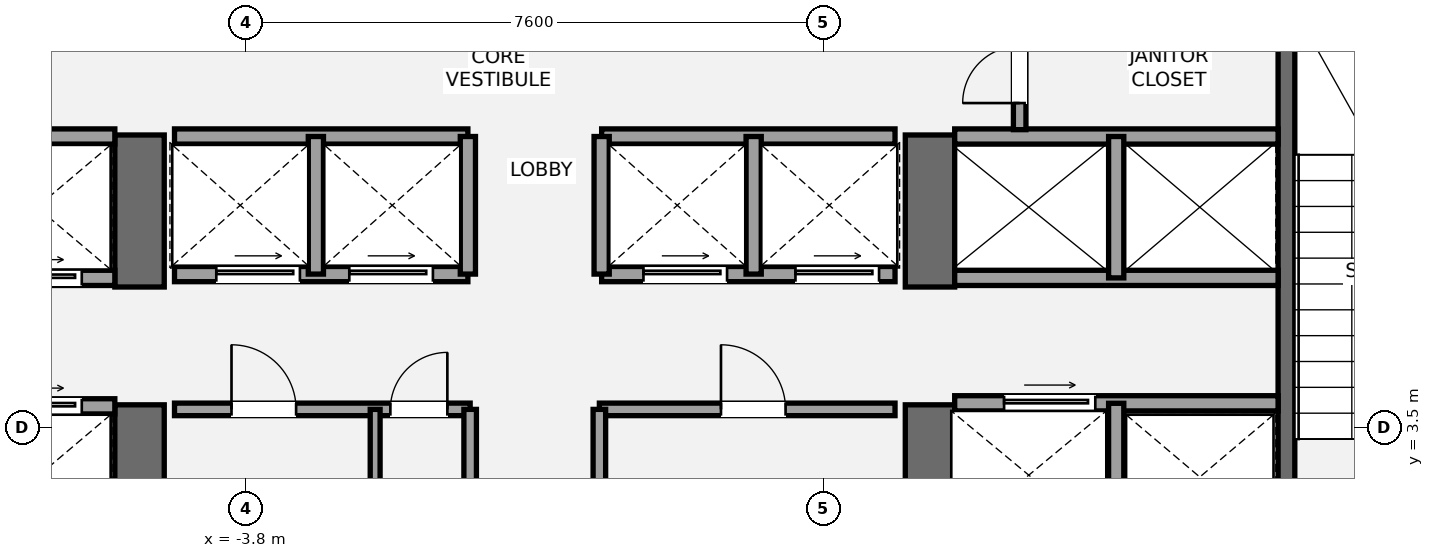
"""IFC4 building model, lengths in metres.
Left out: names, types, materials, properties, quantities, classifications, styles, units other than length and angle.
Written with IfcOpenShell. Run it as: python <this file> out.ifc"""

import sys

from ifc_helpers import new_model, si_unit, direction, frame, frame_2d, origin, place, context, subcontext, project, spatial, rectangle, extrude, element, fill, save


model = new_model("IFC4")
c1 = context("Model", 3, precision=1e-05, world=origin(), true_north=direction((0.0, 1.0)))
c2 = subcontext(c1, "Body", "Model", "MODEL_VIEW")
j1 = project(units=[si_unit("LENGTHUNIT", "METRE"), si_unit("PLANEANGLEUNIT", "RADIAN")], contexts=[c1])
p1 = place(None, origin())
s1 = spatial("IfcSite", under=j1, at=p1, CompositionType="ELEMENT")
p2 = place(p1, origin())
s2 = spatial("IfcBuilding", under=s1, at=p2, CompositionType="ELEMENT")
p3 = place(p2, frame((0.0, 0.0, 139.6)))
s3 = spatial("IfcBuildingStorey", under=s2, at=p3, CompositionType="ELEMENT", Elevation=139.6)
p4 = place(p3, frame((-5.2, 1.2, 0.0), z_axis=(0.0, 0.0, 1.0), x_axis=(0.0, 1.0, 0.0)))
e1 = element("IfcWall", 1, at=p4, inside=s3, PredefinedType="SHEAR", context=c2, shape_type="SweptSolid", body=[
    extrude(rectangle(XDim=2.6, YDim=0.65, at=frame_2d((1.3, 0.0))), origin(), (0.0, 0.0, 1.0), 4.2),
])
p5 = place(p3, frame((-5.2, 5.35, 0.0), z_axis=(0.0, 0.0, 1.0), x_axis=(0.0, 1.0, 0.0)))
e2 = element("IfcWall", 2, at=p5, inside=s3, PredefinedType="SHEAR", context=c2, shape_type="SweptSolid", body=[
    extrude(rectangle(XDim=2.0, YDim=0.65, at=frame_2d((1.0, 0.0))), origin(), (0.0, 0.0, 1.0), 4.2),
])
p6 = place(p3, frame((5.2, 1.2, 0.0), z_axis=(0.0, 0.0, 1.0), x_axis=(0.0, 1.0, 0.0)))
e3 = element("IfcWall", 3, at=p6, inside=s3, PredefinedType="SHEAR", context=c2, shape_type="SweptSolid", body=[
    extrude(rectangle(XDim=2.6, YDim=0.65, at=frame_2d((1.3, 0.0))), origin(), (0.0, 0.0, 1.0), 4.2),
])
p7 = place(p3, frame((5.2, 5.35, 0.0), z_axis=(0.0, 0.0, 1.0), x_axis=(0.0, 1.0, 0.0)))
e4 = element("IfcWall", 4, at=p7, inside=s3, PredefinedType="SHEAR", context=c2, shape_type="SweptSolid", body=[
    extrude(rectangle(XDim=2.0, YDim=0.65, at=frame_2d((1.0, 0.0))), origin(), (0.0, 0.0, 1.0), 4.2),
])
p8 = place(p3, frame((9.89, 1.85, 0.0), z_axis=(0.0, 0.0, 1.0), x_axis=(0.0, 1.0, 0.0)))
e5 = element("IfcWall", 5, at=p8, inside=s3, PredefinedType="SHEAR", context=c2, shape_type="SweptSolid", body=[
    extrude(rectangle(XDim=7.15, YDim=0.22, at=frame_2d((3.575, 0.0))), origin(), (0.0, 0.0, 1.0), 4.2),
])
p9 = place(p3, frame((-9.78, 3.78, 0.0), z_axis=(0.0, 0.0, 1.0), x_axis=(1.0, 0.0, 0.0)))
e6 = element("IfcWall", 6, at=p9, inside=s3, PredefinedType="SOLIDWALL", context=c2, shape_type="SweptSolid", body=[
    extrude(rectangle(XDim=4.255, YDim=0.2, at=frame_2d((2.127, 0.0))), origin(), (0.0, 0.0, 1.0), 4.02),
])
p10 = place(p9, frame((2.72, 0.0, 0.0)))
e7 = element("IfcOpeningElement", 7, at=p10, cuts=e6, PredefinedType="OPENING", context=c2, shape_type="SweptSolid", body=[
    extrude(rectangle(XDim=1.1, YDim=2.2, at=frame_2d((0.55, 1.1))), frame((0.0, 0.11, 0.0), z_axis=(0.0, -1.0, 0.0), x_axis=(1.0, 0.0, 0.0)), (0.0, 0.0, 1.0), 0.22),
])
p11 = place(p3, frame((-9.78, 5.47, 0.0), z_axis=(0.0, 0.0, 1.0), x_axis=(1.0, 0.0, 0.0)))
e8 = element("IfcWall", 8, at=p11, inside=s3, PredefinedType="SOLIDWALL", context=c2, shape_type="SweptSolid", body=[
    extrude(rectangle(XDim=4.255, YDim=0.2, at=frame_2d((2.127, 0.0))), origin(), (0.0, 0.0, 1.0), 4.02),
])
p12 = place(p11, frame((0.55, 0.0, 0.0)))
e9 = element("IfcOpeningElement", 9, at=p12, cuts=e8, PredefinedType="OPENING", context=c2, shape_type="SweptSolid", body=[
    extrude(rectangle(XDim=1.1, YDim=2.2, at=frame_2d((0.55, 1.1))), frame((0.0, 0.11, 0.0), z_axis=(0.0, -1.0, 0.0), x_axis=(1.0, 0.0, 0.0)), (0.0, 0.0, 1.0), 0.22),
])
p13 = place(p11, frame((2.72, 0.0, 0.0)))
e10 = element("IfcOpeningElement", 10, at=p13, cuts=e8, PredefinedType="OPENING", context=c2, shape_type="SweptSolid", body=[
    extrude(rectangle(XDim=1.1, YDim=2.2, at=frame_2d((0.55, 1.1))), frame((0.0, 0.11, 0.0), z_axis=(0.0, -1.0, 0.0), x_axis=(1.0, 0.0, 0.0)), (0.0, 0.0, 1.0), 0.22),
])
p14 = place(p3, frame((-9.78, 7.33, 0.0), z_axis=(0.0, 0.0, 1.0), x_axis=(1.0, 0.0, 0.0)))
e11 = element("IfcWall", 11, at=p14, inside=s3, PredefinedType="SOLIDWALL", context=c2, shape_type="SweptSolid", body=[
    extrude(rectangle(XDim=4.255, YDim=0.2, at=frame_2d((2.127, 0.0))), origin(), (0.0, 0.0, 1.0), 4.02),
])
p15 = place(p3, frame((5.525, 3.82, 0.0), z_axis=(0.0, 0.0, 1.0), x_axis=(1.0, 0.0, 0.0)))
e12 = element("IfcWall", 12, at=p15, inside=s3, PredefinedType="SOLIDWALL", context=c2, shape_type="SweptSolid", body=[
    extrude(rectangle(XDim=4.255, YDim=0.2, at=frame_2d((2.127, 0.0))), origin(), (0.0, 0.0, 1.0), 4.02),
])
p16 = place(p15, frame((0.65, 0.0, 0.0)))
e13 = element("IfcOpeningElement", 13, at=p16, cuts=e12, PredefinedType="OPENING", context=c2, shape_type="SweptSolid", body=[
    extrude(rectangle(XDim=1.2, YDim=2.2, at=frame_2d((0.6, 1.1))), frame((0.0, 0.11, 0.0), z_axis=(0.0, -1.0, 0.0), x_axis=(1.0, 0.0, 0.0)), (0.0, 0.0, 1.0), 0.22),
])
p17 = place(p3, frame((7.65, 1.85, 0.0), z_axis=(0.0, 0.0, 1.0), x_axis=(0.0, 1.0, 0.0)))
e14 = element("IfcWall", 14, at=p17, inside=s3, PredefinedType="SOLIDWALL", context=c2, shape_type="SweptSolid", body=[
    extrude(rectangle(XDim=1.97, YDim=0.2, at=frame_2d((0.985, 0.0))), origin(), (0.0, 0.0, 1.0), 4.02),
])
for number, where, z_axis, x_axis in (
    (15, (5.525, 5.47, 0.0), (0.0, 0.0, 1.0), (1.0, 0.0, 0.0)),
    (16, (5.525, 7.33, 0.0), (0.0, 0.0, 1.0), (1.0, 0.0, 0.0)),
):
    element("IfcWall", number, at=place(p3, frame(where, z_axis=z_axis, x_axis=x_axis)), inside=s3, PredefinedType="SOLIDWALL", context=c2, shape_type="SweptSolid", body=[
        extrude(rectangle(XDim=4.255, YDim=0.2, at=frame_2d((2.127, 0.0))), origin(), (0.0, 0.0, 1.0), 4.02),
    ])
p18 = place(p3, frame((7.65, 5.47, 0.0), z_axis=(0.0, 0.0, 1.0), x_axis=(0.0, 1.0, 0.0)))
e17 = element("IfcWall", 17, at=p18, inside=s3, PredefinedType="SOLIDWALL", context=c2, shape_type="SweptSolid", body=[
    extrude(rectangle(XDim=1.86, YDim=0.2, at=frame_2d((0.93, 0.0))), origin(), (0.0, 0.0, 1.0), 4.02),
])
p19 = place(p3, frame((-4.74, 3.74, 0.0), z_axis=(0.0, 0.0, 1.0), x_axis=(1.0, 0.0, 0.0)))
e18 = element("IfcWall", 18, at=p19, inside=s3, PredefinedType="PARTITIONING", context=c2, shape_type="SweptSolid", body=[
    extrude(rectangle(XDim=3.89, YDim=0.165, at=frame_2d((1.945, 0.0))), origin(), (0.0, 0.0, 1.0), 4.02),
])
p20 = place(p19, frame((0.75, 0.0, 0.0)))
e19 = element("IfcOpeningElement", 19, at=p20, cuts=e18, PredefinedType="OPENING", context=c2, shape_type="SweptSolid", body=[
    extrude(rectangle(XDim=0.85, YDim=2.1, at=frame_2d((0.425, 1.05))), frame((0.0, 0.093, 0.0), z_axis=(0.0, -1.0, 0.0), x_axis=(1.0, 0.0, 0.0)), (0.0, 0.0, 1.0), 0.185),
])
p21 = place(p19, frame((2.84, 0.0, 0.0)))
e20 = element("IfcOpeningElement", 20, at=p21, cuts=e18, PredefinedType="OPENING", context=c2, shape_type="SweptSolid", body=[
    extrude(rectangle(XDim=0.75, YDim=2.1, at=frame_2d((0.375, 1.05))), frame((0.0, 0.093, 0.0), z_axis=(0.0, -1.0, 0.0), x_axis=(1.0, 0.0, 0.0)), (0.0, 0.0, 1.0), 0.185),
])
p22 = place(p3, frame((-0.85, 1.92, 0.0), z_axis=(0.0, 0.0, 1.0), x_axis=(0.0, 1.0, 0.0)))
e21 = element("IfcWall", 21, at=p22, inside=s3, PredefinedType="PARTITIONING", context=c2, shape_type="SweptSolid", body=[
    extrude(rectangle(XDim=1.82, YDim=0.165, at=frame_2d((0.91, 0.0))), origin(), (0.0, 0.0, 1.0), 4.02),
])
p23 = place(p3, frame((0.85, 3.74, 0.0), z_axis=(0.0, 0.0, 1.0), x_axis=(1.0, 0.0, 0.0)))
e22 = element("IfcWall", 22, at=p23, inside=s3, PredefinedType="PARTITIONING", context=c2, shape_type="SweptSolid", body=[
    extrude(rectangle(XDim=3.89, YDim=0.165, at=frame_2d((1.945, 0.0))), origin(), (0.0, 0.0, 1.0), 4.02),
])
p24 = place(p23, frame((1.6, 0.0, 0.0)))
e23 = element("IfcOpeningElement", 23, at=p24, cuts=e22, PredefinedType="OPENING", context=c2, shape_type="SweptSolid", body=[
    extrude(rectangle(XDim=0.85, YDim=2.1, at=frame_2d((0.425, 1.05))), frame((0.0, 0.093, 0.0), z_axis=(0.0, -1.0, 0.0), x_axis=(1.0, 0.0, 0.0)), (0.0, 0.0, 1.0), 0.185),
])
p25 = place(p3, frame((0.85, 1.92, 0.0), z_axis=(0.0, 0.0, 1.0), x_axis=(0.0, 1.0, 0.0)))
e24 = element("IfcWall", 24, at=p25, inside=s3, PredefinedType="PARTITIONING", context=c2, shape_type="SweptSolid", body=[
    extrude(rectangle(XDim=1.82, YDim=0.165, at=frame_2d((0.91, 0.0))), origin(), (0.0, 0.0, 1.0), 4.02),
])
p26 = place(p3, frame((-2.1, 1.92, 0.0), z_axis=(0.0, 0.0, 1.0), x_axis=(0.0, 1.0, 0.0)))
e25 = element("IfcWall", 25, at=p26, inside=s3, PredefinedType="PARTITIONING", context=c2, shape_type="SweptSolid", body=[
    extrude(rectangle(XDim=1.82, YDim=0.13, at=frame_2d((0.91, 0.0))), origin(), (0.0, 0.0, 1.0), 4.02),
])
p27 = place(p3, frame((-4.74, 5.52, 0.0), z_axis=(0.0, 0.0, 1.0), x_axis=(1.0, 0.0, 0.0)))
e26 = element("IfcWall", 26, at=p27, inside=s3, PredefinedType="SOLIDWALL", context=c2, shape_type="SweptSolid", body=[
    extrude(rectangle(XDim=3.86, YDim=0.2, at=frame_2d((1.93, 0.0))), origin(), (0.0, 0.0, 1.0), 4.02),
])
p28 = place(p27, frame((0.55, 0.0, 0.0)))
e27 = element("IfcOpeningElement", 27, at=p28, cuts=e26, PredefinedType="OPENING", context=c2, shape_type="SweptSolid", body=[
    extrude(rectangle(XDim=1.1, YDim=2.2, at=frame_2d((0.55, 1.1))), frame((0.0, 0.11, 0.0), z_axis=(0.0, -1.0, 0.0), x_axis=(1.0, 0.0, 0.0)), (0.0, 0.0, 1.0), 0.22),
])
p29 = place(p27, frame((2.3, 0.0, 0.0)))
e28 = element("IfcOpeningElement", 28, at=p29, cuts=e26, PredefinedType="OPENING", context=c2, shape_type="SweptSolid", body=[
    extrude(rectangle(XDim=1.1, YDim=2.2, at=frame_2d((0.55, 1.1))), frame((0.0, 0.11, 0.0), z_axis=(0.0, -1.0, 0.0), x_axis=(1.0, 0.0, 0.0)), (0.0, 0.0, 1.0), 0.22),
])
p30 = place(p3, frame((0.88, 5.52, 0.0), z_axis=(0.0, 0.0, 1.0), x_axis=(1.0, 0.0, 0.0)))
e29 = element("IfcWall", 29, at=p30, inside=s3, PredefinedType="SOLIDWALL", context=c2, shape_type="SweptSolid", body=[
    extrude(rectangle(XDim=3.86, YDim=0.2, at=frame_2d((1.93, 0.0))), origin(), (0.0, 0.0, 1.0), 4.02),
])
p31 = place(p30, frame((0.55, 0.0, 0.0)))
e30 = element("IfcOpeningElement", 30, at=p31, cuts=e29, PredefinedType="OPENING", context=c2, shape_type="SweptSolid", body=[
    extrude(rectangle(XDim=1.1, YDim=2.2, at=frame_2d((0.55, 1.1))), frame((0.0, 0.11, 0.0), z_axis=(0.0, -1.0, 0.0), x_axis=(1.0, 0.0, 0.0)), (0.0, 0.0, 1.0), 0.22),
])
p32 = place(p30, frame((2.55, 0.0, 0.0)))
e31 = element("IfcOpeningElement", 31, at=p32, cuts=e29, PredefinedType="OPENING", context=c2, shape_type="SweptSolid", body=[
    extrude(rectangle(XDim=1.1, YDim=2.2, at=frame_2d((0.55, 1.1))), frame((0.0, 0.11, 0.0), z_axis=(0.0, -1.0, 0.0), x_axis=(1.0, 0.0, 0.0)), (0.0, 0.0, 1.0), 0.22),
])
for number, where, z_axis, x_axis in (
    (32, (-4.74, 7.33, 0.0), (0.0, 0.0, 1.0), (1.0, 0.0, 0.0)),
    (33, (0.88, 7.33, 0.0), (0.0, 0.0, 1.0), (1.0, 0.0, 0.0)),
):
    element("IfcWall", number, at=place(p3, frame(where, z_axis=z_axis, x_axis=x_axis)), inside=s3, PredefinedType="SOLIDWALL", context=c2, shape_type="SweptSolid", body=[
        extrude(rectangle(XDim=3.86, YDim=0.2, at=frame_2d((1.93, 0.0))), origin(), (0.0, 0.0, 1.0), 4.02),
    ])
for number, where, z_axis, x_axis in (
    (34, (-2.88, 5.52, 0.0), (0.0, 0.0, 1.0), (0.0, 1.0, 0.0)),
    (35, (2.88, 5.52, 0.0), (0.0, 0.0, 1.0), (0.0, 1.0, 0.0)),
    (36, (-0.88, 5.52, 0.0), (0.0, 0.0, 1.0), (0.0, 1.0, 0.0)),
    (37, (0.88, 5.52, 0.0), (0.0, 0.0, 1.0), (0.0, 1.0, 0.0)),
):
    element("IfcWall", number, at=place(p3, frame(where, z_axis=z_axis, x_axis=x_axis)), inside=s3, PredefinedType="SOLIDWALL", context=c2, shape_type="SweptSolid", body=[
        extrude(rectangle(XDim=1.81, YDim=0.2, at=frame_2d((0.905, 0.0))), origin(), (0.0, 0.0, 1.0), 4.02),
    ])
p33 = place(p3, frame((6.38, 7.42, 0.0), z_axis=(0.0, 0.0, 1.0), x_axis=(0.0, 1.0, 0.0)))
e38 = element("IfcWall", 38, at=p33, inside=s3, PredefinedType="PARTITIONING", context=c2, shape_type="SweptSolid", body=[
    extrude(rectangle(XDim=1.58, YDim=0.165, at=frame_2d((0.79, 0.0))), origin(), (0.0, 0.0, 1.0), 4.02),
])
p34 = place(p33, frame((0.35, 0.0, 0.0)))
e39 = element("IfcOpeningElement", 39, at=p34, cuts=e38, PredefinedType="OPENING", context=c2, shape_type="SweptSolid", body=[
    extrude(rectangle(XDim=0.75, YDim=2.1, at=frame_2d((0.375, 1.05))), frame((0.0, 0.093, 0.0), z_axis=(0.0, -1.0, 0.0), x_axis=(1.0, 0.0, 0.0)), (0.0, 0.0, 1.0), 0.185),
])
p35 = place(p13, origin())
e40 = element("IfcDoor", 40, at=p35, inside=s3, OperationType="SLIDING_TO_LEFT", PredefinedType="DOOR", context=c2, shape_type="SweptSolid", body=[
    extrude(rectangle(XDim=1.1, YDim=2.2, at=frame_2d((0.55, 1.1))), frame((0.0, 0.025, 0.0), z_axis=(0.0, -1.0, 0.0), x_axis=(1.0, 0.0, 0.0)), (0.0, 0.0, 1.0), 0.05),
])
fill(e10, e40)
p36 = place(p10, origin())
e41 = element("IfcDoor", 41, at=p36, inside=s3, OperationType="SLIDING_TO_LEFT", PredefinedType="DOOR", context=c2, shape_type="SweptSolid", body=[
    extrude(rectangle(XDim=1.1, YDim=2.2, at=frame_2d((0.55, 1.1))), frame((0.0, 0.025, 0.0), z_axis=(0.0, -1.0, 0.0), x_axis=(1.0, 0.0, 0.0)), (0.0, 0.0, 1.0), 0.05),
])
fill(e7, e41)
p37 = place(p16, origin())
e42 = element("IfcDoor", 42, at=p37, inside=s3, OperationType="SLIDING_TO_RIGHT", PredefinedType="DOOR", context=c2, shape_type="SweptSolid", body=[
    extrude(rectangle(XDim=1.2, YDim=2.2, at=frame_2d((0.6, 1.1))), frame((0.0, 0.025, 0.0), z_axis=(0.0, -1.0, 0.0), x_axis=(1.0, 0.0, 0.0)), (0.0, 0.0, 1.0), 0.05),
])
fill(e13, e42)
p38 = place(p20, origin())
e43 = element("IfcDoor", 43, at=p38, inside=s3, OperationType="SINGLE_SWING_LEFT", PredefinedType="DOOR", context=c2, shape_type="SweptSolid", body=[
    extrude(rectangle(XDim=0.85, YDim=2.1, at=frame_2d((0.425, 1.05))), frame((0.0, 0.025, 0.0), z_axis=(0.0, -1.0, 0.0), x_axis=(1.0, 0.0, 0.0)), (0.0, 0.0, 1.0), 0.05),
])
fill(e19, e43)
p39 = place(p21, origin())
e44 = element("IfcDoor", 44, at=p39, inside=s3, OperationType="SINGLE_SWING_RIGHT", PredefinedType="DOOR", context=c2, shape_type="SweptSolid", body=[
    extrude(rectangle(XDim=0.75, YDim=2.1, at=frame_2d((0.375, 1.05))), frame((0.0, 0.025, 0.0), z_axis=(0.0, -1.0, 0.0), x_axis=(1.0, 0.0, 0.0)), (0.0, 0.0, 1.0), 0.05),
])
fill(e20, e44)
p40 = place(p24, origin())
e45 = element("IfcDoor", 45, at=p40, inside=s3, OperationType="SINGLE_SWING_LEFT", PredefinedType="DOOR", context=c2, shape_type="SweptSolid", body=[
    extrude(rectangle(XDim=0.85, YDim=2.1, at=frame_2d((0.425, 1.05))), frame((0.0, 0.025, 0.0), z_axis=(0.0, -1.0, 0.0), x_axis=(1.0, 0.0, 0.0)), (0.0, 0.0, 1.0), 0.05),
])
fill(e23, e45)
p41 = place(p28, origin())
e46 = element("IfcDoor", 46, at=p41, inside=s3, OperationType="SLIDING_TO_LEFT", PredefinedType="DOOR", context=c2, shape_type="SweptSolid", body=[
    extrude(rectangle(XDim=1.1, YDim=2.2, at=frame_2d((0.55, 1.1))), frame((0.0, 0.025, 0.0), z_axis=(0.0, -1.0, 0.0), x_axis=(1.0, 0.0, 0.0)), (0.0, 0.0, 1.0), 0.05),
])
fill(e27, e46)
p42 = place(p29, origin())
e47 = element("IfcDoor", 47, at=p42, inside=s3, OperationType="SLIDING_TO_LEFT", PredefinedType="DOOR", context=c2, shape_type="SweptSolid", body=[
    extrude(rectangle(XDim=1.1, YDim=2.2, at=frame_2d((0.55, 1.1))), frame((0.0, 0.025, 0.0), z_axis=(0.0, -1.0, 0.0), x_axis=(1.0, 0.0, 0.0)), (0.0, 0.0, 1.0), 0.05),
])
fill(e28, e47)
p43 = place(p31, origin())
e48 = element("IfcDoor", 48, at=p43, inside=s3, OperationType="SLIDING_TO_LEFT", PredefinedType="DOOR", context=c2, shape_type="SweptSolid", body=[
    extrude(rectangle(XDim=1.1, YDim=2.2, at=frame_2d((0.55, 1.1))), frame((0.0, 0.025, 0.0), z_axis=(0.0, -1.0, 0.0), x_axis=(1.0, 0.0, 0.0)), (0.0, 0.0, 1.0), 0.05),
])
fill(e30, e48)
p44 = place(p32, origin())
e49 = element("IfcDoor", 49, at=p44, inside=s3, OperationType="SLIDING_TO_LEFT", PredefinedType="DOOR", context=c2, shape_type="SweptSolid", body=[
    extrude(rectangle(XDim=1.1, YDim=2.2, at=frame_2d((0.55, 1.1))), frame((0.0, 0.025, 0.0), z_axis=(0.0, -1.0, 0.0), x_axis=(1.0, 0.0, 0.0)), (0.0, 0.0, 1.0), 0.05),
])
fill(e31, e49)
p45 = place(p34, origin())
e50 = element("IfcDoor", 50, at=p45, inside=s3, OperationType="SINGLE_SWING_LEFT", PredefinedType="DOOR", context=c2, shape_type="SweptSolid", body=[
    extrude(rectangle(XDim=0.75, YDim=2.1, at=frame_2d((0.375, 1.05))), frame((0.0, 0.025, 0.0), z_axis=(0.0, -1.0, 0.0), x_axis=(1.0, 0.0, 0.0)), (0.0, 0.0, 1.0), 0.05),
])
fill(e39, e50)
save(model, sys.argv[1])
